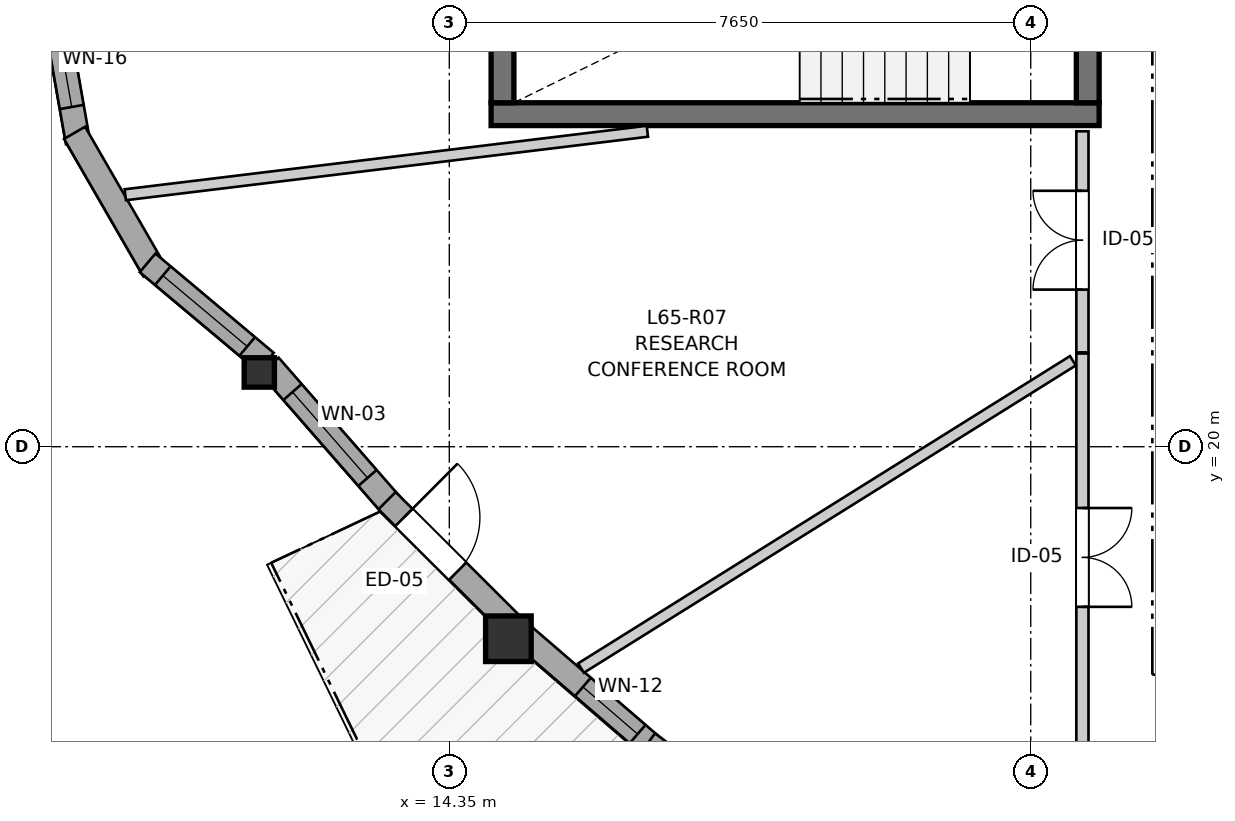
"""IFC4 building model, lengths in metres.
Left out: names, types, materials, properties, quantities, classifications, styles, units other than length and angle.
Written with IfcOpenShell. Run it as: python <this file> out.ifc"""

import sys

from ifc_helpers import new_model, si_unit, direction, frame, frame_2d, origin, origin_2d, place, context, subcontext, project, spatial, rectangle, i_section, extrude, source, transform, mapped, element, fill, save


model = new_model("IFC4")
c1 = context("Model", 3, precision=1e-05, world=origin(), true_north=direction((0.0, 1.0)))
c2 = subcontext(c1, "Body", "Model", "MODEL_VIEW")
j1 = project(units=[si_unit("LENGTHUNIT", "METRE"), si_unit("PLANEANGLEUNIT", "RADIAN")], contexts=[c1])
p1 = place(None, origin())
s1 = spatial("IfcSite", under=j1, at=p1, CompositionType="ELEMENT")
p2 = place(p1, origin())
s2 = spatial("IfcBuilding", under=s1, at=p2, CompositionType="ELEMENT")
p3 = place(p2, frame((0.0, 0.0, 218.0)))
s3 = spatial("IfcBuildingStorey", under=s2, at=p3, CompositionType="ELEMENT", Elevation=218.0)
p4 = place(p3, frame((14.9, 24.375, 0.0), z_axis=(0.0, 0.0, 1.0), x_axis=(1.0, 0.0, 0.0)))
e1 = element("IfcWall", 1, at=p4, inside=s3, PredefinedType="SHEAR", context=c2, shape_type="SweptSolid", body=[
    extrude(rectangle(XDim=8.0, YDim=0.3, at=frame_2d((4.0, 0.0))), origin(), (0.0, 0.0, 1.0), 2.96),
])
p5 = place(p3, frame((15.05, 27.475, 0.0), z_axis=(0.0, 0.0, 1.0), x_axis=(0.0, -1.0, 0.0)))
e2 = element("IfcWall", 2, at=p5, inside=s3, PredefinedType="SHEAR", context=c2, shape_type="SweptSolid", body=[
    extrude(rectangle(XDim=2.95, YDim=0.3, at=frame_2d((1.475, 0.0))), origin(), (0.0, 0.0, 1.0), 2.96),
])
p6 = place(p3, frame((22.75, 24.525, 0.0), z_axis=(0.0, 0.0, 1.0), x_axis=(0.0, 1.0, 0.0)))
e3 = element("IfcWall", 3, at=p6, inside=s3, PredefinedType="SHEAR", context=c2, shape_type="SweptSolid", body=[
    extrude(rectangle(XDim=2.95, YDim=0.3, at=frame_2d((1.475, 0.0))), origin(), (0.0, 0.0, 1.0), 2.96),
])
p7 = place(p6, frame((0.985, 0.0, 0.0)))
e4 = element("IfcOpeningElement", 4, at=p7, cuts=e3, PredefinedType="OPENING", context=c2, shape_type="SweptSolid", body=[
    extrude(rectangle(XDim=0.98, YDim=2.15, at=frame_2d((0.49, 1.075))), frame((0.0, 0.16, 0.0), z_axis=(0.0, -1.0, 0.0), x_axis=(1.0, 0.0, 0.0)), (0.0, 0.0, 1.0), 0.32),
])
m1 = source(origin(), c2, "Body", "SweptSolid", [
    extrude(i_section(OverallWidth=0.398, OverallDepth=0.387, WebThickness=0.019, FlangeThickness=0.03, FilletRadius=0.015, at=origin_2d()), origin(), (0.0, 0.0, 1.0), 2.96),
])
p8 = place(p3, frame((11.85, 20.977, 0.0), z_axis=(0.0, 0.0, 1.0), x_axis=(1.0, 0.0, 0.0)))
e5 = element("IfcColumn", 5, at=p8, inside=s3, PredefinedType="PILASTER", context=c2, shape_type="MappedRepresentation", body=[
    mapped(m1, transform((0.0, 0.0, 0.0), x_axis=(1.0, 0.0, 0.0), y_axis=(0.0, 1.0, 0.0), z_axis=(0.0, 0.0, 1.0), scale=1.0)),
])
m2 = source(origin(), c2, "Body", "SweptSolid", [
    extrude(rectangle(XDim=0.6, YDim=0.6, at=origin_2d()), origin(), (0.0, 0.0, 1.0), 2.96),
])
p9 = place(p3, frame((15.127, 17.474, 0.0), z_axis=(0.0, 0.0, 1.0), x_axis=(1.0, 0.0, 0.0)))
e6 = element("IfcColumn", 6, at=p9, inside=s3, PredefinedType="COLUMN", context=c2, shape_type="MappedRepresentation", body=[
    mapped(m2, transform((0.0, 0.0, 0.0), x_axis=(1.0, 0.0, 0.0), y_axis=(0.0, 1.0, 0.0), z_axis=(0.0, 0.0, 1.0), scale=1.0)),
])
p10 = place(p3, frame((9.101, 26.065, 0.0), z_axis=(0.0, 0.0, 1.0), x_axis=(0.173672066494, -0.984803540469, 0.0)))
e7 = element("IfcWall", 7, at=p10, inside=s3, PredefinedType="SOLIDWALL", context=c2, shape_type="SweptSolid", body=[
    extrude(rectangle(XDim=2.09, YDim=0.32, at=frame_2d((1.045, 0.0))), origin(), (0.0, 0.0, 1.0), 2.58),
])
p11 = place(p10, frame((0.47, 0.0, 0.82)))
e8 = element("IfcOpeningElement", 8, at=p11, cuts=e7, PredefinedType="OPENING", context=c2, shape_type="SweptSolid", body=[
    extrude(rectangle(XDim=1.15, YDim=1.2, at=frame_2d((0.575, 0.6))), frame((0.0, 0.17, 0.0), z_axis=(0.0, -1.0, 0.0), x_axis=(1.0, 0.0, 0.0)), (0.0, 0.0, 1.0), 0.34),
])
p12 = place(p3, frame((9.419, 24.129, 0.0), z_axis=(0.0, 0.0, 1.0), x_axis=(0.499995423472, -0.866028046028, 0.0)))
e9 = element("IfcWall", 9, at=p12, inside=s3, PredefinedType="SOLIDWALL", context=c2, shape_type="SweptSolid", body=[
    extrude(rectangle(XDim=2.09, YDim=0.32, at=frame_2d((1.045, 0.0))), origin(), (0.0, 0.0, 1.0), 2.58),
])
p13 = place(p3, frame((10.381, 22.419, 0.0), z_axis=(0.0, 0.0, 1.0), x_axis=(0.766099948115, -0.642721455608, 0.0)))
e10 = element("IfcWall", 10, at=p13, inside=s3, PredefinedType="SOLIDWALL", context=c2, shape_type="SweptSolid", body=[
    extrude(rectangle(XDim=2.032, YDim=0.32, at=frame_2d((1.016, 0.0))), origin(), (0.0, 0.0, 1.0), 2.58),
])
p14 = place(p13, frame((0.261, 0.0, 0.82)))
e11 = element("IfcOpeningElement", 11, at=p14, cuts=e10, PredefinedType="OPENING", context=c2, shape_type="SweptSolid", body=[
    extrude(rectangle(XDim=1.45, YDim=1.25, at=frame_2d((0.725, 0.625))), frame((0.0, 0.17, 0.0), z_axis=(0.0, -1.0, 0.0), x_axis=(1.0, 0.0, 0.0)), (0.0, 0.0, 1.0), 0.34),
])
p15 = place(p3, frame((11.984, 21.067, 0.0), z_axis=(0.0, 0.0, 1.0), x_axis=(0.657577552216, -0.753386861328, 0.0)))
e12 = element("IfcWall", 12, at=p15, inside=s3, PredefinedType="SOLIDWALL", context=c2, shape_type="SweptSolid", body=[
    extrude(rectangle(XDim=2.444, YDim=0.32, at=frame_2d((1.222, 0.0))), origin(), (0.0, 0.0, 1.0), 2.58),
])
p16 = place(p15, frame((0.462, 0.0, 0.82)))
e13 = element("IfcOpeningElement", 13, at=p16, cuts=e12, PredefinedType="OPENING", context=c2, shape_type="SweptSolid", body=[
    extrude(rectangle(XDim=1.5, YDim=1.45, at=frame_2d((0.75, 0.725))), frame((0.0, 0.17, 0.0), z_axis=(0.0, -1.0, 0.0), x_axis=(1.0, 0.0, 0.0)), (0.0, 0.0, 1.0), 0.34),
])
p17 = place(p3, frame((13.531, 19.29, 0.0), z_axis=(0.0, 0.0, 1.0), x_axis=(0.708419394795, -0.705791726417, 0.0)))
e14 = element("IfcWall", 14, at=p17, inside=s3, PredefinedType="SOLIDWALL", context=c2, shape_type="SweptSolid", body=[
    extrude(rectangle(XDim=2.323, YDim=0.32, at=frame_2d((1.161, 0.0))), origin(), (0.0, 0.0, 1.0), 2.58),
])
p18 = place(p17, frame((0.313, 0.0, 0.0)))
e15 = element("IfcOpeningElement", 15, at=p18, cuts=e14, PredefinedType="OPENING", context=c2, shape_type="SweptSolid", body=[
    extrude(rectangle(XDim=1.0, YDim=2.1, at=frame_2d((0.5, 1.05))), frame((0.0, 0.17, 0.0), z_axis=(0.0, -1.0, 0.0), x_axis=(1.0, 0.0, 0.0)), (0.0, 0.0, 1.0), 0.34),
])
p19 = place(p3, frame((15.3, 17.536, 0.0), z_axis=(0.0, 0.0, 1.0), x_axis=(0.757488333031, -0.652848700177, 0.0)))
e16 = element("IfcWall", 16, at=p19, inside=s3, PredefinedType="SOLIDWALL", context=c2, shape_type="SweptSolid", body=[
    extrude(rectangle(XDim=2.284, YDim=0.32, at=frame_2d((1.142, 0.0))), origin(), (0.0, 0.0, 1.0), 2.58),
])
p20 = place(p19, frame((1.067, 0.0, 0.82)))
e17 = element("IfcOpeningElement", 17, at=p20, cuts=e16, PredefinedType="OPENING", context=c2, shape_type="SweptSolid", body=[
    extrude(rectangle(XDim=0.95, YDim=1.35, at=frame_2d((0.475, 0.675))), frame((0.0, 0.17, 0.0), z_axis=(0.0, -1.0, 0.0), x_axis=(1.0, 0.0, 0.0)), (0.0, 0.0, 1.0), 0.34),
])
p21 = place(p3, frame((16.961, 16.1, 0.0), z_axis=(0.0, 0.0, 1.0), x_axis=(0.803809802043, -0.594886377504, 0.0)))
e18 = element("IfcWall", 18, at=p21, inside=s3, PredefinedType="SOLIDWALL", context=c2, shape_type="SweptSolid", body=[
    extrude(rectangle(XDim=2.328, YDim=0.32, at=frame_2d((1.164, 0.0))), origin(), (0.0, 0.0, 1.0), 2.58),
])
p22 = place(p21, frame((0.649, 0.0, 0.82)))
e19 = element("IfcOpeningElement", 19, at=p22, cuts=e18, PredefinedType="OPENING", context=c2, shape_type="SweptSolid", body=[
    extrude(rectangle(XDim=1.05, YDim=1.45, at=frame_2d((0.525, 0.725))), frame((0.0, 0.17, 0.0), z_axis=(0.0, -1.0, 0.0), x_axis=(1.0, 0.0, 0.0)), (0.0, 0.0, 1.0), 0.34),
])
p23 = place(p3, frame((22.68, 21.226, 0.0), z_axis=(0.0, 0.0, 1.0), x_axis=(0.0, -1.0, 0.0)))
e20 = element("IfcWall", 20, at=p23, inside=s3, PredefinedType="PARTITIONING", context=c2, shape_type="SweptSolid", body=[
    extrude(rectangle(XDim=5.348, YDim=0.16, at=frame_2d((2.674, 0.0))), origin(), (0.0, 0.0, 1.0), 2.96),
])
p24 = place(p23, frame((2.032, 0.0, 0.0)))
e21 = element("IfcOpeningElement", 21, at=p24, cuts=e20, PredefinedType="OPENING", context=c2, shape_type="SweptSolid", body=[
    extrude(rectangle(XDim=1.3, YDim=2.1, at=frame_2d((0.65, 1.05))), frame((0.0, 0.09, 0.0), z_axis=(0.0, -1.0, 0.0), x_axis=(1.0, 0.0, 0.0)), (0.0, 0.0, 1.0), 0.18),
])
p25 = place(p3, frame((22.68, 21.241, 0.0), z_axis=(0.0, 0.0, 1.0), x_axis=(0.0, 1.0, 0.0)))
e22 = element("IfcWall", 22, at=p25, inside=s3, PredefinedType="PARTITIONING", context=c2, shape_type="SweptSolid", body=[
    extrude(rectangle(XDim=2.909, YDim=0.16, at=frame_2d((1.455, 0.0))), origin(), (0.0, 0.0, 1.0), 2.96),
])
p26 = place(p25, frame((0.826, 0.0, 0.0)))
e23 = element("IfcOpeningElement", 23, at=p26, cuts=e22, PredefinedType="OPENING", context=c2, shape_type="SweptSolid", body=[
    extrude(rectangle(XDim=1.3, YDim=2.1, at=frame_2d((0.65, 1.05))), frame((0.0, 0.09, 0.0), z_axis=(0.0, -1.0, 0.0), x_axis=(1.0, 0.0, 0.0)), (0.0, 0.0, 1.0), 0.18),
])
p27 = place(p3, frame((16.083, 17.088, 0.0), z_axis=(0.0, 0.0, 1.0), x_axis=(0.848100737451, 0.529835011239, 0.0)))
e24 = element("IfcWall", 24, at=p27, inside=s3, PredefinedType="PARTITIONING", context=c2, shape_type="SweptSolid", body=[
    extrude(rectangle(XDim=7.631, YDim=0.145, at=frame_2d((3.815, 0.0))), origin(), (0.0, 0.0, 1.0), 2.96),
])
p28 = place(p3, frame((10.087, 23.315, 0.0), z_axis=(0.0, 0.0, 1.0), x_axis=(0.992692853732, 0.120668546642, 0.0)))
e25 = element("IfcWall", 25, at=p28, inside=s3, PredefinedType="PARTITIONING", context=c2, shape_type="SweptSolid", body=[
    extrude(rectangle(XDim=6.919, YDim=0.145, at=frame_2d((3.46, 0.0))), origin(), (0.0, 0.0, 1.0), 2.96),
])
m3 = source(origin(), c2, "Body", "SweptSolid", [
    extrude(rectangle(XDim=1.15, YDim=1.2, at=frame_2d((0.575, 0.6))), frame((0.0, 0.03, 0.0), z_axis=(0.0, -1.0, 0.0), x_axis=(1.0, 0.0, 0.0)), (0.0, 0.0, 1.0), 0.06),
])
p29 = place(p11, origin())
e26 = element("IfcWindow", 26, at=p29, inside=s3, PartitioningType="SINGLE_PANEL", PredefinedType="WINDOW", context=c2, shape_type="MappedRepresentation", body=[
    mapped(m3, transform((0.0, 0.0, 0.0), x_axis=(1.0, 0.0, 0.0), y_axis=(0.0, 1.0, 0.0), z_axis=(0.0, 0.0, 1.0), scale=1.0)),
])
fill(e8, e26)
m4 = source(origin(), c2, "Body", "SweptSolid", [
    extrude(rectangle(XDim=1.45, YDim=1.25, at=frame_2d((0.725, 0.625))), frame((0.0, 0.03, 0.0), z_axis=(0.0, -1.0, 0.0), x_axis=(1.0, 0.0, 0.0)), (0.0, 0.0, 1.0), 0.06),
])
p30 = place(p14, origin())
e27 = element("IfcWindow", 27, at=p30, inside=s3, PartitioningType="SINGLE_PANEL", PredefinedType="WINDOW", context=c2, shape_type="MappedRepresentation", body=[
    mapped(m4, transform((0.0, 0.0, 0.0), x_axis=(1.0, 0.0, 0.0), y_axis=(0.0, 1.0, 0.0), z_axis=(0.0, 0.0, 1.0), scale=1.0)),
])
fill(e11, e27)
m5 = source(origin(), c2, "Body", "SweptSolid", [
    extrude(rectangle(XDim=1.5, YDim=1.45, at=frame_2d((0.75, 0.725))), frame((0.0, 0.03, 0.0), z_axis=(0.0, -1.0, 0.0), x_axis=(1.0, 0.0, 0.0)), (0.0, 0.0, 1.0), 0.06),
])
p31 = place(p16, origin())
e28 = element("IfcWindow", 28, at=p31, inside=s3, PartitioningType="SINGLE_PANEL", PredefinedType="WINDOW", context=c2, shape_type="MappedRepresentation", body=[
    mapped(m5, transform((0.0, 0.0, 0.0), x_axis=(1.0, 0.0, 0.0), y_axis=(0.0, 1.0, 0.0), z_axis=(0.0, 0.0, 1.0), scale=1.0)),
])
fill(e13, e28)
m6 = source(origin(), c2, "Body", "SweptSolid", [
    extrude(rectangle(XDim=0.95, YDim=1.35, at=frame_2d((0.475, 0.675))), frame((0.0, 0.03, 0.0), z_axis=(0.0, -1.0, 0.0), x_axis=(1.0, 0.0, 0.0)), (0.0, 0.0, 1.0), 0.06),
])
p32 = place(p20, origin())
e29 = element("IfcWindow", 29, at=p32, inside=s3, PartitioningType="SINGLE_PANEL", PredefinedType="WINDOW", context=c2, shape_type="MappedRepresentation", body=[
    mapped(m6, transform((0.0, 0.0, 0.0), x_axis=(1.0, 0.0, 0.0), y_axis=(0.0, 1.0, 0.0), z_axis=(0.0, 0.0, 1.0), scale=1.0)),
])
fill(e17, e29)
m7 = source(origin(), c2, "Body", "SweptSolid", [
    extrude(rectangle(XDim=1.0, YDim=2.1, at=frame_2d((0.5, 1.05))), frame((0.0, 0.025, 0.0), z_axis=(0.0, -1.0, 0.0), x_axis=(1.0, 0.0, 0.0)), (0.0, 0.0, 1.0), 0.05),
])
p33 = place(p18, origin())
e30 = element("IfcDoor", 30, at=p33, inside=s3, OperationType="SINGLE_SWING_LEFT", PredefinedType="DOOR", context=c2, shape_type="MappedRepresentation", body=[
    mapped(m7, transform((0.0, 0.0, 0.0), x_axis=(1.0, 0.0, 0.0), y_axis=(0.0, 1.0, 0.0), z_axis=(0.0, 0.0, 1.0), scale=1.0)),
])
fill(e15, e30)
m8 = source(origin(), c2, "Body", "SweptSolid", [
    extrude(rectangle(XDim=1.3, YDim=2.1, at=frame_2d((0.65, 1.05))), frame((0.0, 0.025, 0.0), z_axis=(0.0, -1.0, 0.0), x_axis=(1.0, 0.0, 0.0)), (0.0, 0.0, 1.0), 0.05),
])
p34 = place(p24, origin())
e31 = element("IfcDoor", 31, at=p34, inside=s3, OperationType="DOUBLE_DOOR_SINGLE_SWING", PredefinedType="DOOR", context=c2, shape_type="MappedRepresentation", body=[
    mapped(m8, transform((0.0, 0.0, 0.0), x_axis=(1.0, 0.0, 0.0), y_axis=(0.0, 1.0, 0.0), z_axis=(0.0, 0.0, 1.0), scale=1.0)),
])
fill(e21, e31)
p35 = place(p26, origin())
e32 = element("IfcDoor", 32, at=p35, inside=s3, OperationType="DOUBLE_DOOR_SINGLE_SWING", PredefinedType="DOOR", context=c2, shape_type="MappedRepresentation", body=[
    mapped(m8, transform((0.0, 0.0, 0.0), x_axis=(1.0, 0.0, 0.0), y_axis=(0.0, 1.0, 0.0), z_axis=(0.0, 0.0, 1.0), scale=1.0)),
])
fill(e23, e32)
save(model, sys.argv[1])
